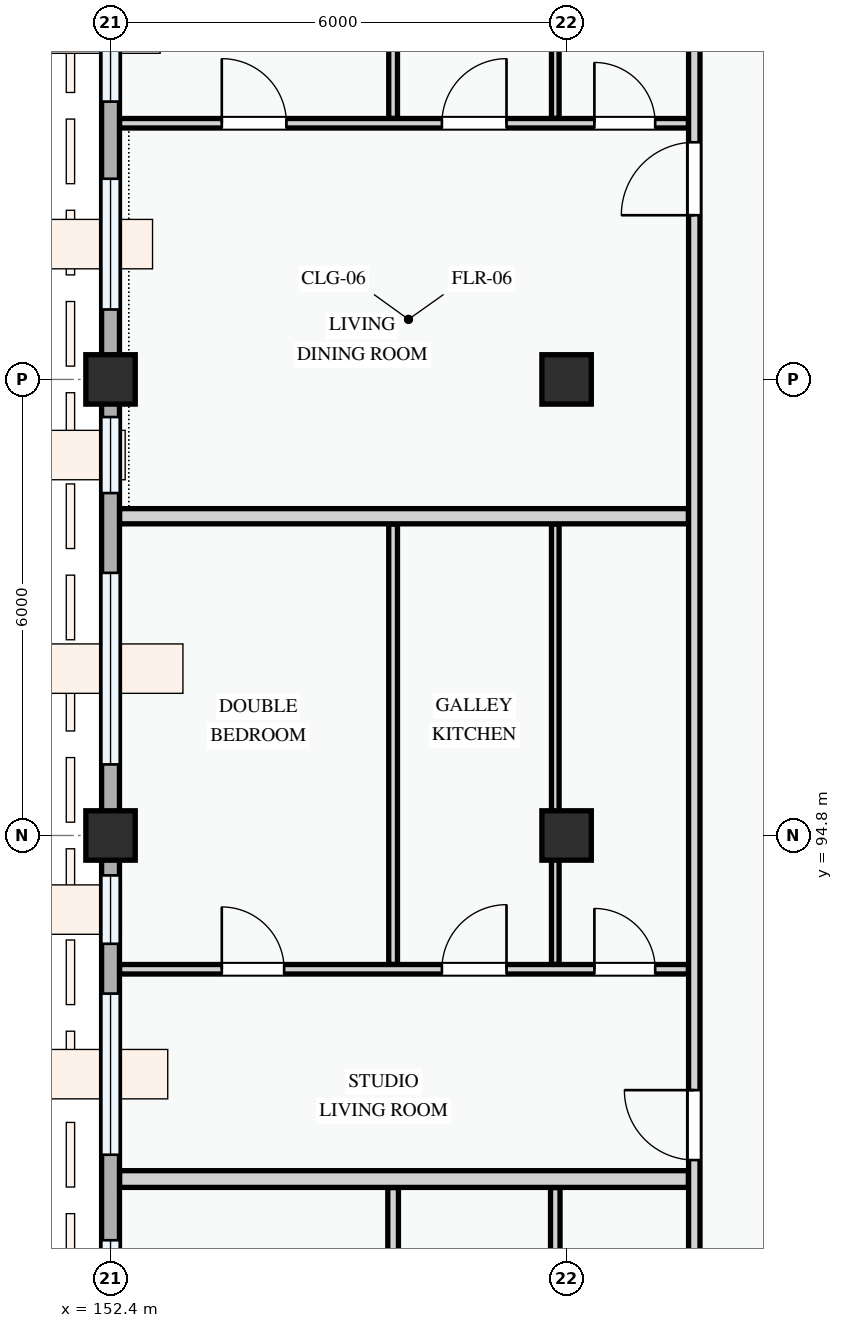
"""IFC4 building model, lengths in metres.
Left out: names, types, materials, properties, quantities, classifications, styles, units other than length and angle.
Written with IfcOpenShell. Run it as: python <this file> out.ifc"""

import sys

from ifc_helpers import new_model, si_unit, direction, frame, frame_2d, origin, origin_2d, place, context, subcontext, project, spatial, rectangle, extrude, element, fill, save


model = new_model("IFC4")
c1 = context("Model", 3, precision=1e-05, world=origin(), true_north=direction((0.0, 1.0)))
c2 = subcontext(c1, "Body", "Model", "MODEL_VIEW")
j1 = project(units=[si_unit("LENGTHUNIT", "METRE"), si_unit("PLANEANGLEUNIT", "RADIAN")], contexts=[c1])
p1 = place(None, origin())
s1 = spatial("IfcSite", under=j1, at=p1, CompositionType="ELEMENT")
p2 = place(p1, origin())
s2 = spatial("IfcBuilding", under=s1, at=p2, CompositionType="ELEMENT")
p3 = place(p2, frame((0.0, 0.0, 8.1)))
s3 = spatial("IfcBuildingStorey", under=s2, at=p3, CompositionType="ELEMENT", Elevation=8.1)
for number, where, z_axis, x_axis in (
    (1, (152.4, 94.8, 0.0), (0.0, 0.0, 1.0), (1.0, 0.0, 0.0)),
    (2, (152.4, 100.8, 0.0), (0.0, 0.0, 1.0), (1.0, 0.0, 0.0)),
    (3, (158.4, 94.8, 0.0), (0.0, 0.0, 1.0), (1.0, 0.0, 0.0)),
    (4, (158.4, 100.8, 0.0), (0.0, 0.0, 1.0), (1.0, 0.0, 0.0)),
):
    element("IfcColumn", number, at=place(p3, frame(where, z_axis=z_axis, x_axis=x_axis)), inside=s3, PredefinedType="COLUMN", context=c2, shape_type="SweptSolid", body=[
        extrude(rectangle(XDim=0.65, YDim=0.65, at=origin_2d()), origin(), (0.0, 0.0, 1.0), 3.3),
    ])
p4 = place(p3, frame((152.4, 109.2, 0.0), z_axis=(0.0, 0.0, 1.0), x_axis=(0.0, -1.0, 0.0)))
e5 = element("IfcWall", 5, at=p4, inside=s3, PredefinedType="STANDARD", context=c2, shape_type="SweptSolid", body=[
    extrude(rectangle(XDim=8.4, YDim=0.235, at=frame_2d((4.2, 0.0))), origin(), (0.0, 0.0, 1.0), 2.425),
])
p5 = place(p4, frame((0.645, 0.0, 0.78)))
e6 = element("IfcOpeningElement", 6, at=p5, cuts=e5, PredefinedType="OPENING", context=c2, shape_type="SweptSolid", body=[
    extrude(rectangle(XDim=1.58, YDim=1.48, at=frame_2d((0.79, 0.74))), frame((0.0, 0.127, 0.0), z_axis=(0.0, -1.0, 0.0), x_axis=(1.0, 0.0, 0.0)), (0.0, 0.0, 1.0), 0.255),
])
p6 = place(p4, frame((2.825, 0.0, 0.78)))
e7 = element("IfcOpeningElement", 7, at=p6, cuts=e5, PredefinedType="OPENING", context=c2, shape_type="SweptSolid", body=[
    extrude(rectangle(XDim=1.92, YDim=1.44, at=frame_2d((0.96, 0.72))), frame((0.0, 0.127, 0.0), z_axis=(0.0, -1.0, 0.0), x_axis=(1.0, 0.0, 0.0)), (0.0, 0.0, 1.0), 0.255),
])
p7 = place(p4, frame((5.76, 0.0, 0.78)))
e8 = element("IfcOpeningElement", 8, at=p7, cuts=e5, PredefinedType="OPENING", context=c2, shape_type="SweptSolid", body=[
    extrude(rectangle(XDim=1.72, YDim=1.52, at=frame_2d((0.86, 0.76))), frame((0.0, 0.127, 0.0), z_axis=(0.0, -1.0, 0.0), x_axis=(1.0, 0.0, 0.0)), (0.0, 0.0, 1.0), 0.255),
])
p8 = place(p3, frame((152.4, 100.8, 0.0), z_axis=(0.0, 0.0, 1.0), x_axis=(0.0, -1.0, 0.0)))
e9 = element("IfcWall", 9, at=p8, inside=s3, PredefinedType="STANDARD", context=c2, shape_type="SweptSolid", body=[
    extrude(rectangle(XDim=6.0, YDim=0.235, at=frame_2d((3.0, 0.0))), origin(), (0.0, 0.0, 1.0), 2.575),
])
p9 = place(p8, frame((0.495, 0.0, 0.78)))
e10 = element("IfcOpeningElement", 10, at=p9, cuts=e9, PredefinedType="OPENING", context=c2, shape_type="SweptSolid", body=[
    extrude(rectangle(XDim=1.0, YDim=1.25, at=frame_2d((0.5, 0.625))), frame((0.0, 0.127, 0.0), z_axis=(0.0, -1.0, 0.0), x_axis=(1.0, 0.0, 0.0)), (0.0, 0.0, 1.0), 0.255),
])
p10 = place(p8, frame((2.545, 0.0, 0.78)))
e11 = element("IfcOpeningElement", 11, at=p10, cuts=e9, PredefinedType="OPENING", context=c2, shape_type="SweptSolid", body=[
    extrude(rectangle(XDim=2.52, YDim=1.5, at=frame_2d((1.26, 0.75))), frame((0.0, 0.127, 0.0), z_axis=(0.0, -1.0, 0.0), x_axis=(1.0, 0.0, 0.0)), (0.0, 0.0, 1.0), 0.255),
])
p11 = place(p3, frame((152.4, 94.8, 0.0), z_axis=(0.0, 0.0, 1.0), x_axis=(0.0, -1.0, 0.0)))
e12 = element("IfcWall", 12, at=p11, inside=s3, PredefinedType="STANDARD", context=c2, shape_type="SweptSolid", body=[
    extrude(rectangle(XDim=8.4, YDim=0.235, at=frame_2d((4.2, 0.0))), origin(), (0.0, 0.0, 1.0), 2.425),
])
p12 = place(p11, frame((0.525, 0.0, 0.78)))
e13 = element("IfcOpeningElement", 13, at=p12, cuts=e12, PredefinedType="OPENING", context=c2, shape_type="SweptSolid", body=[
    extrude(rectangle(XDim=0.9, YDim=1.2, at=frame_2d((0.45, 0.6))), frame((0.0, 0.127, 0.0), z_axis=(0.0, -1.0, 0.0), x_axis=(1.0, 0.0, 0.0)), (0.0, 0.0, 1.0), 0.255),
])
p13 = place(p11, frame((2.08, 0.0, 0.78)))
e14 = element("IfcOpeningElement", 14, at=p13, cuts=e12, PredefinedType="OPENING", context=c2, shape_type="SweptSolid", body=[
    extrude(rectangle(XDim=2.12, YDim=1.44, at=frame_2d((1.06, 0.72))), frame((0.0, 0.127, 0.0), z_axis=(0.0, -1.0, 0.0), x_axis=(1.0, 0.0, 0.0)), (0.0, 0.0, 1.0), 0.255),
])
p14 = place(p11, frame((5.325, 0.0, 0.78)))
e15 = element("IfcOpeningElement", 15, at=p14, cuts=e12, PredefinedType="OPENING", context=c2, shape_type="SweptSolid", body=[
    extrude(rectangle(XDim=2.08, YDim=1.52, at=frame_2d((1.04, 0.76))), frame((0.0, 0.127, 0.0), z_axis=(0.0, -1.0, 0.0), x_axis=(1.0, 0.0, 0.0)), (0.0, 0.0, 1.0), 0.255),
])
p15 = place(p3, frame((156.118, 84.722, 0.0), z_axis=(0.0, 0.0, 1.0), x_axis=(0.0, 1.0, 0.0)))
e16 = element("IfcWall", 16, at=p15, inside=s3, PredefinedType="PARTITIONING", context=c2, shape_type="SweptSolid", body=[
    extrude(rectangle(XDim=5.446, YDim=0.14, at=frame_2d((2.723, 0.0))), origin(), (0.0, 0.0, 1.0), 3.0),
])
p16 = place(p3, frame((158.251, 84.722, 0.0), z_axis=(0.0, 0.0, 1.0), x_axis=(0.0, 1.0, 0.0)))
e17 = element("IfcWall", 17, at=p16, inside=s3, PredefinedType="PARTITIONING", context=c2, shape_type="SweptSolid", body=[
    extrude(rectangle(XDim=5.446, YDim=0.125, at=frame_2d((2.723, 0.0))), origin(), (0.0, 0.0, 1.0), 2.425),
])
p17 = place(p3, frame((152.52, 93.04, 0.0), z_axis=(0.0, 0.0, 1.0), x_axis=(1.0, 0.0, 0.0)))
e18 = element("IfcWall", 18, at=p17, inside=s3, PredefinedType="PARTITIONING", context=c2, shape_type="SweptSolid", body=[
    extrude(rectangle(XDim=7.483, YDim=0.125, at=frame_2d((3.742, 0.0))), origin(), (0.0, 0.0, 1.0), 3.0),
])
p18 = place(p17, frame((1.344, 0.0, 0.0)))
e19 = element("IfcOpeningElement", 19, at=p18, cuts=e18, PredefinedType="OPENING", context=c2, shape_type="SweptSolid", body=[
    extrude(rectangle(XDim=0.82, YDim=2.08, at=frame_2d((0.41, 1.04))), frame((0.0, 0.073, 0.0), z_axis=(0.0, -1.0, 0.0), x_axis=(1.0, 0.0, 0.0)), (0.0, 0.0, 1.0), 0.145),
])
p19 = place(p17, frame((4.24, 0.0, 0.0)))
e20 = element("IfcOpeningElement", 20, at=p19, cuts=e18, PredefinedType="OPENING", context=c2, shape_type="SweptSolid", body=[
    extrude(rectangle(XDim=0.85, YDim=2.1, at=frame_2d((0.425, 1.05))), frame((0.0, 0.073, 0.0), z_axis=(0.0, -1.0, 0.0), x_axis=(1.0, 0.0, 0.0)), (0.0, 0.0, 1.0), 0.145),
])
p20 = place(p17, frame((6.246, 0.0, 0.0)))
e21 = element("IfcOpeningElement", 21, at=p20, cuts=e18, PredefinedType="OPENING", context=c2, shape_type="SweptSolid", body=[
    extrude(rectangle(XDim=0.8, YDim=2.1, at=frame_2d((0.4, 1.05))), frame((0.0, 0.073, 0.0), z_axis=(0.0, -1.0, 0.0), x_axis=(1.0, 0.0, 0.0)), (0.0, 0.0, 1.0), 0.145),
])
p21 = place(p3, frame((156.118, 93.104, 0.0), z_axis=(0.0, 0.0, 1.0), x_axis=(0.0, 1.0, 0.0)))
e22 = element("IfcWall", 22, at=p21, inside=s3, PredefinedType="PARTITIONING", context=c2, shape_type="SweptSolid", body=[
    extrude(rectangle(XDim=5.793, YDim=0.115, at=frame_2d((2.897, 0.0))), origin(), (0.0, 0.0, 1.0), 3.0),
])
p22 = place(p3, frame((158.251, 93.104, 0.0), z_axis=(0.0, 0.0, 1.0), x_axis=(0.0, 1.0, 0.0)))
e23 = element("IfcWall", 23, at=p22, inside=s3, PredefinedType="PARTITIONING", context=c2, shape_type="SweptSolid", body=[
    extrude(rectangle(XDim=5.793, YDim=0.1, at=frame_2d((2.897, 0.0))), origin(), (0.0, 0.0, 1.0), 2.425),
])
p23 = place(p3, frame((152.52, 90.28, 0.0), z_axis=(0.0, 0.0, 1.0), x_axis=(1.0, 0.0, 0.0)))
e24 = element("IfcWall", 24, at=p23, inside=s3, PredefinedType="PARTITIONING", context=c2, shape_type="SweptSolid", body=[
    extrude(rectangle(XDim=7.483, YDim=0.22, at=frame_2d((3.742, 0.0))), origin(), (0.0, 0.0, 1.0), 3.0),
])
p24 = place(p3, frame((152.52, 104.17, 0.0), z_axis=(0.0, 0.0, 1.0), x_axis=(1.0, 0.0, 0.0)))
e25 = element("IfcWall", 25, at=p24, inside=s3, PredefinedType="PARTITIONING", context=c2, shape_type="SweptSolid", body=[
    extrude(rectangle(XDim=7.483, YDim=0.125, at=frame_2d((3.742, 0.0))), origin(), (0.0, 0.0, 1.0), 3.0),
])
p25 = place(p24, frame((1.344, 0.0, 0.0)))
e26 = element("IfcOpeningElement", 26, at=p25, cuts=e25, PredefinedType="OPENING", context=c2, shape_type="SweptSolid", body=[
    extrude(rectangle(XDim=0.85, YDim=2.1, at=frame_2d((0.425, 1.05))), frame((0.0, 0.073, 0.0), z_axis=(0.0, -1.0, 0.0), x_axis=(1.0, 0.0, 0.0)), (0.0, 0.0, 1.0), 0.145),
])
p26 = place(p24, frame((4.24, 0.0, 0.0)))
e27 = element("IfcOpeningElement", 27, at=p26, cuts=e25, PredefinedType="OPENING", context=c2, shape_type="SweptSolid", body=[
    extrude(rectangle(XDim=0.85, YDim=2.1, at=frame_2d((0.425, 1.05))), frame((0.0, 0.073, 0.0), z_axis=(0.0, -1.0, 0.0), x_axis=(1.0, 0.0, 0.0)), (0.0, 0.0, 1.0), 0.145),
])
p27 = place(p24, frame((6.246, 0.0, 0.0)))
e28 = element("IfcOpeningElement", 28, at=p27, cuts=e25, PredefinedType="OPENING", context=c2, shape_type="SweptSolid", body=[
    extrude(rectangle(XDim=0.8, YDim=2.1, at=frame_2d((0.4, 1.05))), frame((0.0, 0.073, 0.0), z_axis=(0.0, -1.0, 0.0), x_axis=(1.0, 0.0, 0.0)), (0.0, 0.0, 1.0), 0.145),
])
p28 = place(p3, frame((156.118, 104.235, 0.0), z_axis=(0.0, 0.0, 1.0), x_axis=(0.0, 1.0, 0.0)))
e29 = element("IfcWall", 29, at=p28, inside=s3, PredefinedType="PARTITIONING", context=c2, shape_type="SweptSolid", body=[
    extrude(rectangle(XDim=5.011, YDim=0.115, at=frame_2d((2.505, 0.0))), origin(), (0.0, 0.0, 1.0), 3.0),
])
p29 = place(p3, frame((158.251, 104.235, 0.0), z_axis=(0.0, 0.0, 1.0), x_axis=(0.0, 1.0, 0.0)))
e30 = element("IfcWall", 30, at=p29, inside=s3, PredefinedType="PARTITIONING", context=c2, shape_type="SweptSolid", body=[
    extrude(rectangle(XDim=5.011, YDim=0.1, at=frame_2d((2.505, 0.0))), origin(), (0.0, 0.0, 1.0), 2.425),
])
p30 = place(p3, frame((152.52, 99.0, 0.0), z_axis=(0.0, 0.0, 1.0), x_axis=(1.0, 0.0, 0.0)))
e31 = element("IfcWall", 31, at=p30, inside=s3, PredefinedType="PARTITIONING", context=c2, shape_type="SweptSolid", body=[
    extrude(rectangle(XDim=7.483, YDim=0.2, at=frame_2d((3.742, 0.0))), origin(), (0.0, 0.0, 1.0), 3.0),
])
p31 = place(p3, frame((160.08, 80.52, 0.0), z_axis=(0.0, 0.0, 1.0), x_axis=(0.0, 1.0, 0.0)))
e32 = element("IfcWall", 32, at=p31, inside=s3, PredefinedType="PARTITIONING", context=c2, shape_type="SweptSolid", body=[
    extrude(rectangle(XDim=28.821, YDim=0.15, at=frame_2d((14.41, 0.0))), origin(), (0.0, 0.0, 1.0), 3.0),
])
p32 = place(p31, frame((2.425, 0.0, 0.0)))
e33 = element("IfcOpeningElement", 33, at=p32, cuts=e32, PredefinedType="OPENING", context=c2, shape_type="SweptSolid", body=[
    extrude(rectangle(XDim=0.92, YDim=2.1, at=frame_2d((0.46, 1.05))), frame((0.0, 0.085, 0.0), z_axis=(0.0, -1.0, 0.0), x_axis=(1.0, 0.0, 0.0)), (0.0, 0.0, 1.0), 0.17),
])
p33 = place(p31, frame((10.01, 0.0, 0.0)))
e34 = element("IfcOpeningElement", 34, at=p33, cuts=e32, PredefinedType="OPENING", context=c2, shape_type="SweptSolid", body=[
    extrude(rectangle(XDim=0.92, YDim=2.1, at=frame_2d((0.46, 1.05))), frame((0.0, 0.085, 0.0), z_axis=(0.0, -1.0, 0.0), x_axis=(1.0, 0.0, 0.0)), (0.0, 0.0, 1.0), 0.17),
])
p34 = place(p31, frame((22.44, 0.0, 0.0)))
e35 = element("IfcOpeningElement", 35, at=p34, cuts=e32, PredefinedType="OPENING", context=c2, shape_type="SweptSolid", body=[
    extrude(rectangle(XDim=0.96, YDim=2.12, at=frame_2d((0.48, 1.06))), frame((0.0, 0.085, 0.0), z_axis=(0.0, -1.0, 0.0), x_axis=(1.0, 0.0, 0.0)), (0.0, 0.0, 1.0), 0.17),
])
p35 = place(p6, origin())
e36 = element("IfcWindow", 36, at=p35, inside=s3, PartitioningType="DOUBLE_PANEL_VERTICAL", PredefinedType="WINDOW", context=c2, shape_type="SweptSolid", body=[
    extrude(rectangle(XDim=1.92, YDim=1.44, at=frame_2d((0.96, 0.72))), frame((0.0, 0.03, 0.0), z_axis=(0.0, -1.0, 0.0), x_axis=(1.0, 0.0, 0.0)), (0.0, 0.0, 1.0), 0.06),
])
fill(e7, e36)
p36 = place(p7, origin())
e37 = element("IfcWindow", 37, at=p36, inside=s3, PartitioningType="DOUBLE_PANEL_VERTICAL", PredefinedType="WINDOW", context=c2, shape_type="SweptSolid", body=[
    extrude(rectangle(XDim=1.72, YDim=1.52, at=frame_2d((0.86, 0.76))), frame((0.0, 0.03, 0.0), z_axis=(0.0, -1.0, 0.0), x_axis=(1.0, 0.0, 0.0)), (0.0, 0.0, 1.0), 0.06),
])
fill(e8, e37)
p37 = place(p9, origin())
e38 = element("IfcWindow", 38, at=p37, inside=s3, PartitioningType="SINGLE_PANEL", PredefinedType="WINDOW", context=c2, shape_type="SweptSolid", body=[
    extrude(rectangle(XDim=1.0, YDim=1.25, at=frame_2d((0.5, 0.625))), frame((0.0, 0.03, 0.0), z_axis=(0.0, -1.0, 0.0), x_axis=(1.0, 0.0, 0.0)), (0.0, 0.0, 1.0), 0.06),
])
fill(e10, e38)
p38 = place(p10, origin())
e39 = element("IfcWindow", 39, at=p38, inside=s3, PartitioningType="DOUBLE_PANEL_VERTICAL", PredefinedType="WINDOW", context=c2, shape_type="SweptSolid", body=[
    extrude(rectangle(XDim=2.52, YDim=1.5, at=frame_2d((1.26, 0.75))), frame((0.0, 0.03, 0.0), z_axis=(0.0, -1.0, 0.0), x_axis=(1.0, 0.0, 0.0)), (0.0, 0.0, 1.0), 0.06),
])
fill(e11, e39)
p39 = place(p12, origin())
e40 = element("IfcWindow", 40, at=p39, inside=s3, PartitioningType="SINGLE_PANEL", PredefinedType="WINDOW", context=c2, shape_type="SweptSolid", body=[
    extrude(rectangle(XDim=0.9, YDim=1.2, at=frame_2d((0.45, 0.6))), frame((0.0, 0.03, 0.0), z_axis=(0.0, -1.0, 0.0), x_axis=(1.0, 0.0, 0.0)), (0.0, 0.0, 1.0), 0.06),
])
fill(e13, e40)
p40 = place(p13, origin())
e41 = element("IfcWindow", 41, at=p40, inside=s3, PartitioningType="DOUBLE_PANEL_VERTICAL", PredefinedType="WINDOW", context=c2, shape_type="SweptSolid", body=[
    extrude(rectangle(XDim=2.12, YDim=1.44, at=frame_2d((1.06, 0.72))), frame((0.0, 0.03, 0.0), z_axis=(0.0, -1.0, 0.0), x_axis=(1.0, 0.0, 0.0)), (0.0, 0.0, 1.0), 0.06),
])
fill(e14, e41)
p41 = place(p14, origin())
e42 = element("IfcWindow", 42, at=p41, inside=s3, PartitioningType="DOUBLE_PANEL_VERTICAL", PredefinedType="WINDOW", context=c2, shape_type="SweptSolid", body=[
    extrude(rectangle(XDim=2.08, YDim=1.52, at=frame_2d((1.04, 0.76))), frame((0.0, 0.03, 0.0), z_axis=(0.0, -1.0, 0.0), x_axis=(1.0, 0.0, 0.0)), (0.0, 0.0, 1.0), 0.06),
])
fill(e15, e42)
p42 = place(p18, origin())
e43 = element("IfcDoor", 43, at=p42, inside=s3, OperationType="SINGLE_SWING_LEFT", PredefinedType="DOOR", context=c2, shape_type="SweptSolid", body=[
    extrude(rectangle(XDim=0.82, YDim=2.08, at=frame_2d((0.41, 1.04))), frame((0.0, 0.025, 0.0), z_axis=(0.0, -1.0, 0.0), x_axis=(1.0, 0.0, 0.0)), (0.0, 0.0, 1.0), 0.05),
])
fill(e19, e43)
p43 = place(p19, origin())
e44 = element("IfcDoor", 44, at=p43, inside=s3, OperationType="SINGLE_SWING_RIGHT", PredefinedType="DOOR", context=c2, shape_type="SweptSolid", body=[
    extrude(rectangle(XDim=0.85, YDim=2.1, at=frame_2d((0.425, 1.05))), frame((0.0, 0.025, 0.0), z_axis=(0.0, -1.0, 0.0), x_axis=(1.0, 0.0, 0.0)), (0.0, 0.0, 1.0), 0.05),
])
fill(e20, e44)
p44 = place(p20, origin())
e45 = element("IfcDoor", 45, at=p44, inside=s3, OperationType="SINGLE_SWING_LEFT", PredefinedType="DOOR", context=c2, shape_type="SweptSolid", body=[
    extrude(rectangle(XDim=0.8, YDim=2.1, at=frame_2d((0.4, 1.05))), frame((0.0, 0.025, 0.0), z_axis=(0.0, -1.0, 0.0), x_axis=(1.0, 0.0, 0.0)), (0.0, 0.0, 1.0), 0.05),
])
fill(e21, e45)
p45 = place(p25, origin())
e46 = element("IfcDoor", 46, at=p45, inside=s3, OperationType="SINGLE_SWING_LEFT", PredefinedType="DOOR", context=c2, shape_type="SweptSolid", body=[
    extrude(rectangle(XDim=0.85, YDim=2.1, at=frame_2d((0.425, 1.05))), frame((0.0, 0.025, 0.0), z_axis=(0.0, -1.0, 0.0), x_axis=(1.0, 0.0, 0.0)), (0.0, 0.0, 1.0), 0.05),
])
fill(e26, e46)
p46 = place(p26, origin())
e47 = element("IfcDoor", 47, at=p46, inside=s3, OperationType="SINGLE_SWING_RIGHT", PredefinedType="DOOR", context=c2, shape_type="SweptSolid", body=[
    extrude(rectangle(XDim=0.85, YDim=2.1, at=frame_2d((0.425, 1.05))), frame((0.0, 0.025, 0.0), z_axis=(0.0, -1.0, 0.0), x_axis=(1.0, 0.0, 0.0)), (0.0, 0.0, 1.0), 0.05),
])
fill(e27, e47)
p47 = place(p27, origin())
e48 = element("IfcDoor", 48, at=p47, inside=s3, OperationType="SINGLE_SWING_LEFT", PredefinedType="DOOR", context=c2, shape_type="SweptSolid", body=[
    extrude(rectangle(XDim=0.8, YDim=2.1, at=frame_2d((0.4, 1.05))), frame((0.0, 0.025, 0.0), z_axis=(0.0, -1.0, 0.0), x_axis=(1.0, 0.0, 0.0)), (0.0, 0.0, 1.0), 0.05),
])
fill(e28, e48)
p48 = place(p33, origin())
e49 = element("IfcDoor", 49, at=p48, inside=s3, OperationType="SINGLE_SWING_RIGHT", PredefinedType="DOOR", context=c2, shape_type="SweptSolid", body=[
    extrude(rectangle(XDim=0.92, YDim=2.1, at=frame_2d((0.46, 1.05))), frame((0.0, 0.025, 0.0), z_axis=(0.0, -1.0, 0.0), x_axis=(1.0, 0.0, 0.0)), (0.0, 0.0, 1.0), 0.05),
])
fill(e34, e49)
p49 = place(p34, origin())
e50 = element("IfcDoor", 50, at=p49, inside=s3, OperationType="SINGLE_SWING_LEFT", PredefinedType="DOOR", context=c2, shape_type="SweptSolid", body=[
    extrude(rectangle(XDim=0.96, YDim=2.12, at=frame_2d((0.48, 1.06))), frame((0.0, 0.025, 0.0), z_axis=(0.0, -1.0, 0.0), x_axis=(1.0, 0.0, 0.0)), (0.0, 0.0, 1.0), 0.05),
])
fill(e35, e50)
save(model, sys.argv[1])
